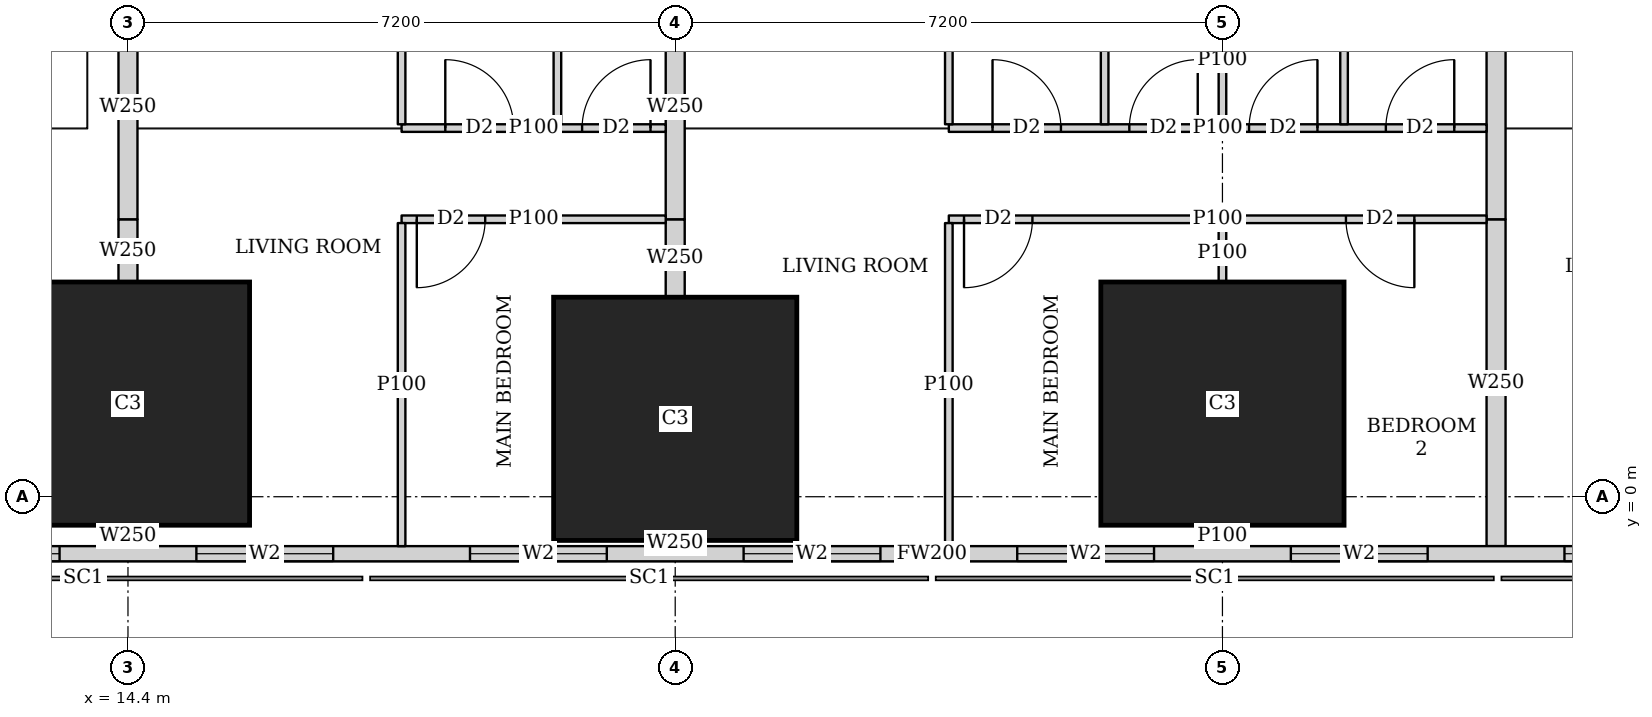
"""IFC4 building model, lengths in metres.
Left out: names, types, materials, properties, quantities, classifications, styles, units other than length and angle.
Written with IfcOpenShell. Run it as: python <this file> out.ifc"""

import sys

from ifc_helpers import new_model, si_unit, direction, frame, frame_2d, origin, origin_2d, place, context, subcontext, project, spatial, rectangle, extrude, element, fill, save


model = new_model("IFC4")
c1 = context("Model", 3, precision=1e-05, world=origin(), true_north=direction((0.0, 1.0)))
c2 = subcontext(c1, "Body", "Model", "MODEL_VIEW")
j1 = project(units=[si_unit("LENGTHUNIT", "METRE"), si_unit("PLANEANGLEUNIT", "RADIAN")], contexts=[c1])
p1 = place(None, origin())
s1 = spatial("IfcSite", under=j1, at=p1, CompositionType="ELEMENT")
p2 = place(p1, origin())
s2 = spatial("IfcBuilding", under=s1, at=p2, CompositionType="ELEMENT")
p3 = place(p2, frame((0.0, 0.0, 23.75)))
s3 = spatial("IfcBuildingStorey", under=s2, at=p3, CompositionType="ELEMENT", Elevation=23.75)
for number, where, z_axis, x_axis in (
    (1, (14.4, 1.225, 0.0), (0.0, 0.0, 1.0), (1.0, 0.0, 0.0)),
    (2, (21.6, 1.025, 0.0), (0.0, 0.0, 1.0), (1.0, 0.0, 0.0)),
    (3, (28.8, 1.225, 0.0), (0.0, 0.0, 1.0), (1.0, 0.0, 0.0)),
):
    element("IfcColumn", number, at=place(p3, frame(where, z_axis=z_axis, x_axis=x_axis)), inside=s3, PredefinedType="COLUMN", context=c2, shape_type="SweptSolid", body=[
        extrude(rectangle(XDim=3.2, YDim=3.2, at=origin_2d()), origin(), (0.0, 0.0, 1.0), 3.75),
    ])
p4 = place(p3, frame((2.163, -0.75, 0.0), z_axis=(0.0, 0.0, 1.0), x_axis=(1.0, 0.0, 0.0)))
e4 = element("IfcWall", 4, at=p4, inside=s3, PredefinedType="SOLIDWALL", context=c2, shape_type="SweptSolid", body=[
    extrude(rectangle(XDim=45.628, YDim=0.2, at=frame_2d((22.814, 0.0))), origin(), (0.0, 0.0, 1.0), 3.5),
])
p5 = place(p4, frame((9.537, 0.0, 0.9)))
e5 = element("IfcOpeningElement", 5, at=p5, cuts=e4, PredefinedType="OPENING", context=c2, shape_type="SweptSolid", body=[
    extrude(rectangle(XDim=1.8, YDim=1.5, at=frame_2d((0.9, 0.75))), frame((0.0, 0.11, 0.0), z_axis=(0.0, -1.0, 0.0), x_axis=(1.0, 0.0, 0.0)), (0.0, 0.0, 1.0), 0.22),
])
p6 = place(p4, frame((13.137, 0.0, 0.9)))
e6 = element("IfcOpeningElement", 6, at=p6, cuts=e4, PredefinedType="OPENING", context=c2, shape_type="SweptSolid", body=[
    extrude(rectangle(XDim=1.8, YDim=1.5, at=frame_2d((0.9, 0.75))), frame((0.0, 0.11, 0.0), z_axis=(0.0, -1.0, 0.0), x_axis=(1.0, 0.0, 0.0)), (0.0, 0.0, 1.0), 0.22),
])
p7 = place(p4, frame((16.737, 0.0, 0.9)))
e7 = element("IfcOpeningElement", 7, at=p7, cuts=e4, PredefinedType="OPENING", context=c2, shape_type="SweptSolid", body=[
    extrude(rectangle(XDim=1.8, YDim=1.5, at=frame_2d((0.9, 0.75))), frame((0.0, 0.11, 0.0), z_axis=(0.0, -1.0, 0.0), x_axis=(1.0, 0.0, 0.0)), (0.0, 0.0, 1.0), 0.22),
])
p8 = place(p4, frame((20.337, 0.0, 0.9)))
e8 = element("IfcOpeningElement", 8, at=p8, cuts=e4, PredefinedType="OPENING", context=c2, shape_type="SweptSolid", body=[
    extrude(rectangle(XDim=1.8, YDim=1.5, at=frame_2d((0.9, 0.75))), frame((0.0, 0.11, 0.0), z_axis=(0.0, -1.0, 0.0), x_axis=(1.0, 0.0, 0.0)), (0.0, 0.0, 1.0), 0.22),
])
p9 = place(p4, frame((23.937, 0.0, 0.9)))
e9 = element("IfcOpeningElement", 9, at=p9, cuts=e4, PredefinedType="OPENING", context=c2, shape_type="SweptSolid", body=[
    extrude(rectangle(XDim=1.8, YDim=1.5, at=frame_2d((0.9, 0.75))), frame((0.0, 0.11, 0.0), z_axis=(0.0, -1.0, 0.0), x_axis=(1.0, 0.0, 0.0)), (0.0, 0.0, 1.0), 0.22),
])
p10 = place(p4, frame((27.537, 0.0, 0.9)))
e10 = element("IfcOpeningElement", 10, at=p10, cuts=e4, PredefinedType="OPENING", context=c2, shape_type="SweptSolid", body=[
    extrude(rectangle(XDim=1.8, YDim=1.5, at=frame_2d((0.9, 0.75))), frame((0.0, 0.11, 0.0), z_axis=(0.0, -1.0, 0.0), x_axis=(1.0, 0.0, 0.0)), (0.0, 0.0, 1.0), 0.22),
])
p11 = place(p4, frame((31.137, 0.0, 0.9)))
e11 = element("IfcOpeningElement", 11, at=p11, cuts=e4, PredefinedType="OPENING", context=c2, shape_type="SweptSolid", body=[
    extrude(rectangle(XDim=1.8, YDim=1.5, at=frame_2d((0.9, 0.75))), frame((0.0, 0.11, 0.0), z_axis=(0.0, -1.0, 0.0), x_axis=(1.0, 0.0, 0.0)), (0.0, 0.0, 1.0), 0.22),
])
p12 = place(p4, frame((34.737, 0.0, 0.9)))
e12 = element("IfcOpeningElement", 12, at=p12, cuts=e4, PredefinedType="OPENING", context=c2, shape_type="SweptSolid", body=[
    extrude(rectangle(XDim=1.8, YDim=1.5, at=frame_2d((0.9, 0.75))), frame((0.0, 0.11, 0.0), z_axis=(0.0, -1.0, 0.0), x_axis=(1.0, 0.0, 0.0)), (0.0, 0.0, 1.0), 0.22),
])
p13 = place(p3, frame((21.475, 3.65, 0.0), z_axis=(0.0, 0.0, 1.0), x_axis=(-1.0, 0.0, 0.0)))
e13 = element("IfcWall", 13, at=p13, inside=s3, PredefinedType="PARTITIONING", context=c2, shape_type="SweptSolid", body=[
    extrude(rectangle(XDim=3.475, YDim=0.1, at=frame_2d((1.738, 0.0))), origin(), (0.0, 0.0, 1.0), 3.5),
])
p14 = place(p13, frame((2.375, 0.0, 0.0)))
e14 = element("IfcOpeningElement", 14, at=p14, cuts=e13, PredefinedType="OPENING", context=c2, shape_type="SweptSolid", body=[
    extrude(rectangle(XDim=0.9, YDim=2.1, at=frame_2d((0.45, 1.05))), frame((0.0, 0.06, 0.0), z_axis=(0.0, -1.0, 0.0), x_axis=(1.0, 0.0, 0.0)), (0.0, 0.0, 1.0), 0.12),
])
p15 = place(p3, frame((21.475, 4.85, 0.0), z_axis=(0.0, 0.0, 1.0), x_axis=(-1.0, 0.0, 0.0)))
e15 = element("IfcWall", 15, at=p15, inside=s3, PredefinedType="PARTITIONING", context=c2, shape_type="SweptSolid", body=[
    extrude(rectangle(XDim=3.475, YDim=0.1, at=frame_2d((1.738, 0.0))), origin(), (0.0, 0.0, 1.0), 3.5),
])
p16 = place(p15, frame((2.0, 0.0, 0.0)))
e16 = element("IfcOpeningElement", 16, at=p16, cuts=e15, PredefinedType="OPENING", context=c2, shape_type="SweptSolid", body=[
    extrude(rectangle(XDim=0.9, YDim=2.1, at=frame_2d((0.45, 1.05))), frame((0.0, 0.06, 0.0), z_axis=(0.0, -1.0, 0.0), x_axis=(1.0, 0.0, 0.0)), (0.0, 0.0, 1.0), 0.12),
])
p17 = place(p15, frame((0.2, 0.0, 0.0)))
e17 = element("IfcOpeningElement", 17, at=p17, cuts=e15, PredefinedType="OPENING", context=c2, shape_type="SweptSolid", body=[
    extrude(rectangle(XDim=0.9, YDim=2.1, at=frame_2d((0.45, 1.05))), frame((0.0, 0.06, 0.0), z_axis=(0.0, -1.0, 0.0), x_axis=(1.0, 0.0, 0.0)), (0.0, 0.0, 1.0), 0.12),
])
p18 = place(p3, frame((18.0, -0.65, 0.0), z_axis=(0.0, 0.0, 1.0), x_axis=(0.0, 1.0, 0.0)))
e18 = element("IfcWall", 18, at=p18, inside=s3, PredefinedType="PARTITIONING", context=c2, shape_type="SweptSolid", body=[
    extrude(rectangle(XDim=4.25, YDim=0.1, at=frame_2d((2.125, 0.0))), origin(), (0.0, 0.0, 1.0), 2.05),
])
for number, where, z_axis, x_axis in (
    (19, (18.0, 4.9, 0.0), (0.0, 0.0, 1.0), (0.0, 1.0, 0.0)),
    (20, (20.05, 4.9, 0.0), (0.0, 0.0, 1.0), (0.0, 1.0, 0.0)),
):
    element("IfcWall", number, at=place(p3, frame(where, z_axis=z_axis, x_axis=x_axis)), inside=s3, PredefinedType="PARTITIONING", context=c2, shape_type="SweptSolid", body=[
        extrude(rectangle(XDim=3.525, YDim=0.1, at=frame_2d((1.763, 0.0))), origin(), (0.0, 0.0, 1.0), 3.5),
    ])
p19 = place(p3, frame((14.4, -0.65, 0.0), z_axis=(0.0, 0.0, 1.0), x_axis=(0.0, 1.0, 0.0)))
e21 = element("IfcWall", 21, at=p19, inside=s3, PredefinedType="SOLIDWALL", context=c2, shape_type="SweptSolid", body=[
    extrude(rectangle(XDim=0.274, YDim=0.25, at=frame_2d((0.137, 0.0))), origin(), (0.0, 0.0, 1.0), 2.05),
])
p20 = place(p3, frame((14.4, 2.826, 0.0), z_axis=(0.0, 0.0, 1.0), x_axis=(0.0, 1.0, 0.0)))
e22 = element("IfcWall", 22, at=p20, inside=s3, PredefinedType="SOLIDWALL", context=c2, shape_type="SweptSolid", body=[
    extrude(rectangle(XDim=0.824, YDim=0.25, at=frame_2d((0.412, 0.0))), origin(), (0.0, 0.0, 1.0), 2.05),
])
p21 = place(p3, frame((14.4, 3.65, 0.0), z_axis=(0.0, 0.0, 1.0), x_axis=(0.0, 1.0, 0.0)))
e23 = element("IfcWall", 23, at=p21, inside=s3, PredefinedType="SOLIDWALL", context=c2, shape_type="SweptSolid", body=[
    extrude(rectangle(XDim=2.949, YDim=0.25, at=frame_2d((1.475, 0.0))), origin(), (0.0, 0.0, 1.0), 3.5),
])
p22 = place(p3, frame((32.275, 3.65, 0.0), z_axis=(0.0, 0.0, 1.0), x_axis=(-1.0, 0.0, 0.0)))
e24 = element("IfcWall", 24, at=p22, inside=s3, PredefinedType="PARTITIONING", context=c2, shape_type="SweptSolid", body=[
    extrude(rectangle(XDim=7.075, YDim=0.1, at=frame_2d((3.538, 0.0))), origin(), (0.0, 0.0, 1.0), 3.5),
])
p23 = place(p22, frame((5.975, 0.0, 0.0)))
e25 = element("IfcOpeningElement", 25, at=p23, cuts=e24, PredefinedType="OPENING", context=c2, shape_type="SweptSolid", body=[
    extrude(rectangle(XDim=0.9, YDim=2.1, at=frame_2d((0.45, 1.05))), frame((0.0, 0.06, 0.0), z_axis=(0.0, -1.0, 0.0), x_axis=(1.0, 0.0, 0.0)), (0.0, 0.0, 1.0), 0.12),
])
p24 = place(p22, frame((0.95, 0.0, 0.0)))
e26 = element("IfcOpeningElement", 26, at=p24, cuts=e24, PredefinedType="OPENING", context=c2, shape_type="SweptSolid", body=[
    extrude(rectangle(XDim=0.9, YDim=2.1, at=frame_2d((0.45, 1.05))), frame((0.0, 0.06, 0.0), z_axis=(0.0, -1.0, 0.0), x_axis=(1.0, 0.0, 0.0)), (0.0, 0.0, 1.0), 0.12),
])
p25 = place(p3, frame((32.275, 4.85, 0.0), z_axis=(0.0, 0.0, 1.0), x_axis=(-1.0, 0.0, 0.0)))
e27 = element("IfcWall", 27, at=p25, inside=s3, PredefinedType="PARTITIONING", context=c2, shape_type="SweptSolid", body=[
    extrude(rectangle(XDim=7.075, YDim=0.1, at=frame_2d((3.538, 0.0))), origin(), (0.0, 0.0, 1.0), 3.5),
])
p26 = place(p25, frame((5.6, 0.0, 0.0)))
e28 = element("IfcOpeningElement", 28, at=p26, cuts=e27, PredefinedType="OPENING", context=c2, shape_type="SweptSolid", body=[
    extrude(rectangle(XDim=0.9, YDim=2.1, at=frame_2d((0.45, 1.05))), frame((0.0, 0.06, 0.0), z_axis=(0.0, -1.0, 0.0), x_axis=(1.0, 0.0, 0.0)), (0.0, 0.0, 1.0), 0.12),
])
p27 = place(p25, frame((2.225, 0.0, 0.0)))
e29 = element("IfcOpeningElement", 29, at=p27, cuts=e27, PredefinedType="OPENING", context=c2, shape_type="SweptSolid", body=[
    extrude(rectangle(XDim=0.9, YDim=2.1, at=frame_2d((0.45, 1.05))), frame((0.0, 0.06, 0.0), z_axis=(0.0, -1.0, 0.0), x_axis=(1.0, 0.0, 0.0)), (0.0, 0.0, 1.0), 0.12),
])
p28 = place(p25, frame((3.8, 0.0, 0.0)))
e30 = element("IfcOpeningElement", 30, at=p28, cuts=e27, PredefinedType="OPENING", context=c2, shape_type="SweptSolid", body=[
    extrude(rectangle(XDim=0.9, YDim=2.1, at=frame_2d((0.45, 1.05))), frame((0.0, 0.06, 0.0), z_axis=(0.0, -1.0, 0.0), x_axis=(1.0, 0.0, 0.0)), (0.0, 0.0, 1.0), 0.12),
])
p29 = place(p25, frame((0.425, 0.0, 0.0)))
e31 = element("IfcOpeningElement", 31, at=p29, cuts=e27, PredefinedType="OPENING", context=c2, shape_type="SweptSolid", body=[
    extrude(rectangle(XDim=0.9, YDim=2.1, at=frame_2d((0.45, 1.05))), frame((0.0, 0.06, 0.0), z_axis=(0.0, -1.0, 0.0), x_axis=(1.0, 0.0, 0.0)), (0.0, 0.0, 1.0), 0.12),
])
p30 = place(p3, frame((25.2, -0.65, 0.0), z_axis=(0.0, 0.0, 1.0), x_axis=(0.0, 1.0, 0.0)))
e32 = element("IfcWall", 32, at=p30, inside=s3, PredefinedType="PARTITIONING", context=c2, shape_type="SweptSolid", body=[
    extrude(rectangle(XDim=4.25, YDim=0.1, at=frame_2d((2.125, 0.0))), origin(), (0.0, 0.0, 1.0), 2.05),
])
p31 = place(p3, frame((28.8, -0.65, 0.0), z_axis=(0.0, 0.0, 1.0), x_axis=(0.0, 1.0, 0.0)))
e33 = element("IfcWall", 33, at=p31, inside=s3, PredefinedType="PARTITIONING", context=c2, shape_type="SweptSolid", body=[
    extrude(rectangle(XDim=0.274, YDim=0.1, at=frame_2d((0.137, 0.0))), origin(), (0.0, 0.0, 1.0), 3.5),
])
p32 = place(p3, frame((28.8, 2.826, 0.0), z_axis=(0.0, 0.0, 1.0), x_axis=(0.0, 1.0, 0.0)))
e34 = element("IfcWall", 34, at=p32, inside=s3, PredefinedType="PARTITIONING", context=c2, shape_type="SweptSolid", body=[
    extrude(rectangle(XDim=0.774, YDim=0.1, at=frame_2d((0.387, 0.0))), origin(), (0.0, 0.0, 1.0), 3.5),
])
p33 = place(p3, frame((25.2, 4.9, 0.0), z_axis=(0.0, 0.0, 1.0), x_axis=(0.0, 1.0, 0.0)))
e35 = element("IfcWall", 35, at=p33, inside=s3, PredefinedType="PARTITIONING", context=c2, shape_type="SweptSolid", body=[
    extrude(rectangle(XDim=3.525, YDim=0.1, at=frame_2d((1.763, 0.0))), origin(), (0.0, 0.0, 1.0), 3.5),
])
p34 = place(p3, frame((28.8, 4.9, 0.0), z_axis=(0.0, 0.0, 1.0), x_axis=(0.0, 1.0, 0.0)))
e36 = element("IfcWall", 36, at=p34, inside=s3, PredefinedType="PARTITIONING", context=c2, shape_type="SweptSolid", body=[
    extrude(rectangle(XDim=1.699, YDim=0.1, at=frame_2d((0.85, 0.0))), origin(), (0.0, 0.0, 1.0), 3.5),
])
for number, where, z_axis, x_axis in (
    (37, (27.25, 4.9, 0.0), (0.0, 0.0, 1.0), (0.0, 1.0, 0.0)),
    (38, (30.4, 4.9, 0.0), (0.0, 0.0, 1.0), (0.0, 1.0, 0.0)),
):
    element("IfcWall", number, at=place(p3, frame(where, z_axis=z_axis, x_axis=x_axis)), inside=s3, PredefinedType="PARTITIONING", context=c2, shape_type="SweptSolid", body=[
        extrude(rectangle(XDim=3.525, YDim=0.1, at=frame_2d((1.763, 0.0))), origin(), (0.0, 0.0, 1.0), 3.5),
    ])
p35 = place(p3, frame((21.6, -0.65, 0.0), z_axis=(0.0, 0.0, 1.0), x_axis=(0.0, 1.0, 0.0)))
e39 = element("IfcWall", 39, at=p35, inside=s3, PredefinedType="SOLIDWALL", context=c2, shape_type="SweptSolid", body=[
    extrude(rectangle(XDim=0.074, YDim=0.25, at=frame_2d((0.037, 0.0))), origin(), (0.0, 0.0, 1.0), 2.05),
])
p36 = place(p3, frame((21.6, 2.626, 0.0), z_axis=(0.0, 0.0, 1.0), x_axis=(0.0, 1.0, 0.0)))
e40 = element("IfcWall", 40, at=p36, inside=s3, PredefinedType="SOLIDWALL", context=c2, shape_type="SweptSolid", body=[
    extrude(rectangle(XDim=1.024, YDim=0.25, at=frame_2d((0.512, 0.0))), origin(), (0.0, 0.0, 1.0), 2.05),
])
p37 = place(p3, frame((21.6, 3.65, 0.0), z_axis=(0.0, 0.0, 1.0), x_axis=(0.0, 1.0, 0.0)))
e41 = element("IfcWall", 41, at=p37, inside=s3, PredefinedType="SOLIDWALL", context=c2, shape_type="SweptSolid", body=[
    extrude(rectangle(XDim=2.949, YDim=0.25, at=frame_2d((1.475, 0.0))), origin(), (0.0, 0.0, 1.0), 3.5),
])
p38 = place(p3, frame((32.4, -0.65, 0.0), z_axis=(0.0, 0.0, 1.0), x_axis=(0.0, 1.0, 0.0)))
e42 = element("IfcWall", 42, at=p38, inside=s3, PredefinedType="SOLIDWALL", context=c2, shape_type="SweptSolid", body=[
    extrude(rectangle(XDim=4.3, YDim=0.25, at=frame_2d((2.15, 0.0))), origin(), (0.0, 0.0, 1.0), 2.05),
])
p39 = place(p3, frame((32.4, 3.65, 0.0), z_axis=(0.0, 0.0, 1.0), x_axis=(0.0, 1.0, 0.0)))
e43 = element("IfcWall", 43, at=p39, inside=s3, PredefinedType="SOLIDWALL", context=c2, shape_type="SweptSolid", body=[
    extrude(rectangle(XDim=4.775, YDim=0.25, at=frame_2d((2.388, 0.0))), origin(), (0.0, 0.0, 1.0), 3.5),
])
p40 = place(p5, origin())
e44 = element("IfcWindow", 44, at=p40, inside=s3, PartitioningType="SINGLE_PANEL", PredefinedType="WINDOW", context=c2, shape_type="SweptSolid", body=[
    extrude(rectangle(XDim=1.8, YDim=1.5, at=frame_2d((0.9, 0.75))), frame((0.0, 0.03, 0.0), z_axis=(0.0, -1.0, 0.0), x_axis=(1.0, 0.0, 0.0)), (0.0, 0.0, 1.0), 0.06),
])
fill(e5, e44)
p41 = place(p6, origin())
e45 = element("IfcWindow", 45, at=p41, inside=s3, PartitioningType="SINGLE_PANEL", PredefinedType="WINDOW", context=c2, shape_type="SweptSolid", body=[
    extrude(rectangle(XDim=1.8, YDim=1.5, at=frame_2d((0.9, 0.75))), frame((0.0, 0.03, 0.0), z_axis=(0.0, -1.0, 0.0), x_axis=(1.0, 0.0, 0.0)), (0.0, 0.0, 1.0), 0.06),
])
fill(e6, e45)
p42 = place(p7, origin())
e46 = element("IfcWindow", 46, at=p42, inside=s3, PartitioningType="SINGLE_PANEL", PredefinedType="WINDOW", context=c2, shape_type="SweptSolid", body=[
    extrude(rectangle(XDim=1.8, YDim=1.5, at=frame_2d((0.9, 0.75))), frame((0.0, 0.03, 0.0), z_axis=(0.0, -1.0, 0.0), x_axis=(1.0, 0.0, 0.0)), (0.0, 0.0, 1.0), 0.06),
])
fill(e7, e46)
p43 = place(p8, origin())
e47 = element("IfcWindow", 47, at=p43, inside=s3, PartitioningType="SINGLE_PANEL", PredefinedType="WINDOW", context=c2, shape_type="SweptSolid", body=[
    extrude(rectangle(XDim=1.8, YDim=1.5, at=frame_2d((0.9, 0.75))), frame((0.0, 0.03, 0.0), z_axis=(0.0, -1.0, 0.0), x_axis=(1.0, 0.0, 0.0)), (0.0, 0.0, 1.0), 0.06),
])
fill(e8, e47)
p44 = place(p9, origin())
e48 = element("IfcWindow", 48, at=p44, inside=s3, PartitioningType="SINGLE_PANEL", PredefinedType="WINDOW", context=c2, shape_type="SweptSolid", body=[
    extrude(rectangle(XDim=1.8, YDim=1.5, at=frame_2d((0.9, 0.75))), frame((0.0, 0.03, 0.0), z_axis=(0.0, -1.0, 0.0), x_axis=(1.0, 0.0, 0.0)), (0.0, 0.0, 1.0), 0.06),
])
fill(e9, e48)
p45 = place(p10, origin())
e49 = element("IfcWindow", 49, at=p45, inside=s3, PartitioningType="SINGLE_PANEL", PredefinedType="WINDOW", context=c2, shape_type="SweptSolid", body=[
    extrude(rectangle(XDim=1.8, YDim=1.5, at=frame_2d((0.9, 0.75))), frame((0.0, 0.03, 0.0), z_axis=(0.0, -1.0, 0.0), x_axis=(1.0, 0.0, 0.0)), (0.0, 0.0, 1.0), 0.06),
])
fill(e10, e49)
p46 = place(p11, origin())
e50 = element("IfcWindow", 50, at=p46, inside=s3, PartitioningType="SINGLE_PANEL", PredefinedType="WINDOW", context=c2, shape_type="SweptSolid", body=[
    extrude(rectangle(XDim=1.8, YDim=1.5, at=frame_2d((0.9, 0.75))), frame((0.0, 0.03, 0.0), z_axis=(0.0, -1.0, 0.0), x_axis=(1.0, 0.0, 0.0)), (0.0, 0.0, 1.0), 0.06),
])
fill(e11, e50)
p47 = place(p14, origin())
e51 = element("IfcDoor", 51, at=p47, inside=s3, OperationType="SINGLE_SWING_RIGHT", PredefinedType="DOOR", context=c2, shape_type="SweptSolid", body=[
    extrude(rectangle(XDim=0.9, YDim=2.1, at=frame_2d((0.45, 1.05))), frame((0.0, 0.025, 0.0), z_axis=(0.0, -1.0, 0.0), x_axis=(1.0, 0.0, 0.0)), (0.0, 0.0, 1.0), 0.05),
])
fill(e14, e51)
p48 = place(p16, origin())
e52 = element("IfcDoor", 52, at=p48, inside=s3, OperationType="SINGLE_SWING_LEFT", PredefinedType="DOOR", context=c2, shape_type="SweptSolid", body=[
    extrude(rectangle(XDim=0.9, YDim=2.1, at=frame_2d((0.45, 1.05))), frame((0.0, 0.025, 0.0), z_axis=(0.0, -1.0, 0.0), x_axis=(1.0, 0.0, 0.0)), (0.0, 0.0, 1.0), 0.05),
])
fill(e16, e52)
p49 = place(p17, origin())
e53 = element("IfcDoor", 53, at=p49, inside=s3, OperationType="SINGLE_SWING_RIGHT", PredefinedType="DOOR", context=c2, shape_type="SweptSolid", body=[
    extrude(rectangle(XDim=0.9, YDim=2.1, at=frame_2d((0.45, 1.05))), frame((0.0, 0.025, 0.0), z_axis=(0.0, -1.0, 0.0), x_axis=(1.0, 0.0, 0.0)), (0.0, 0.0, 1.0), 0.05),
])
fill(e17, e53)
p50 = place(p23, origin())
e54 = element("IfcDoor", 54, at=p50, inside=s3, OperationType="SINGLE_SWING_RIGHT", PredefinedType="DOOR", context=c2, shape_type="SweptSolid", body=[
    extrude(rectangle(XDim=0.9, YDim=2.1, at=frame_2d((0.45, 1.05))), frame((0.0, 0.025, 0.0), z_axis=(0.0, -1.0, 0.0), x_axis=(1.0, 0.0, 0.0)), (0.0, 0.0, 1.0), 0.05),
])
fill(e25, e54)
p51 = place(p24, origin())
e55 = element("IfcDoor", 55, at=p51, inside=s3, OperationType="SINGLE_SWING_LEFT", PredefinedType="DOOR", context=c2, shape_type="SweptSolid", body=[
    extrude(rectangle(XDim=0.9, YDim=2.1, at=frame_2d((0.45, 1.05))), frame((0.0, 0.025, 0.0), z_axis=(0.0, -1.0, 0.0), x_axis=(1.0, 0.0, 0.0)), (0.0, 0.0, 1.0), 0.05),
])
fill(e26, e55)
p52 = place(p26, origin())
e56 = element("IfcDoor", 56, at=p52, inside=s3, OperationType="SINGLE_SWING_LEFT", PredefinedType="DOOR", context=c2, shape_type="SweptSolid", body=[
    extrude(rectangle(XDim=0.9, YDim=2.1, at=frame_2d((0.45, 1.05))), frame((0.0, 0.025, 0.0), z_axis=(0.0, -1.0, 0.0), x_axis=(1.0, 0.0, 0.0)), (0.0, 0.0, 1.0), 0.05),
])
fill(e28, e56)
p53 = place(p27, origin())
e57 = element("IfcDoor", 57, at=p53, inside=s3, OperationType="SINGLE_SWING_RIGHT", PredefinedType="DOOR", context=c2, shape_type="SweptSolid", body=[
    extrude(rectangle(XDim=0.9, YDim=2.1, at=frame_2d((0.45, 1.05))), frame((0.0, 0.025, 0.0), z_axis=(0.0, -1.0, 0.0), x_axis=(1.0, 0.0, 0.0)), (0.0, 0.0, 1.0), 0.05),
])
fill(e29, e57)
p54 = place(p28, origin())
e58 = element("IfcDoor", 58, at=p54, inside=s3, OperationType="SINGLE_SWING_RIGHT", PredefinedType="DOOR", context=c2, shape_type="SweptSolid", body=[
    extrude(rectangle(XDim=0.9, YDim=2.1, at=frame_2d((0.45, 1.05))), frame((0.0, 0.025, 0.0), z_axis=(0.0, -1.0, 0.0), x_axis=(1.0, 0.0, 0.0)), (0.0, 0.0, 1.0), 0.05),
])
fill(e30, e58)
p55 = place(p29, origin())
e59 = element("IfcDoor", 59, at=p55, inside=s3, OperationType="SINGLE_SWING_RIGHT", PredefinedType="DOOR", context=c2, shape_type="SweptSolid", body=[
    extrude(rectangle(XDim=0.9, YDim=2.1, at=frame_2d((0.45, 1.05))), frame((0.0, 0.025, 0.0), z_axis=(0.0, -1.0, 0.0), x_axis=(1.0, 0.0, 0.0)), (0.0, 0.0, 1.0), 0.05),
])
fill(e31, e59)
save(model, sys.argv[1])
